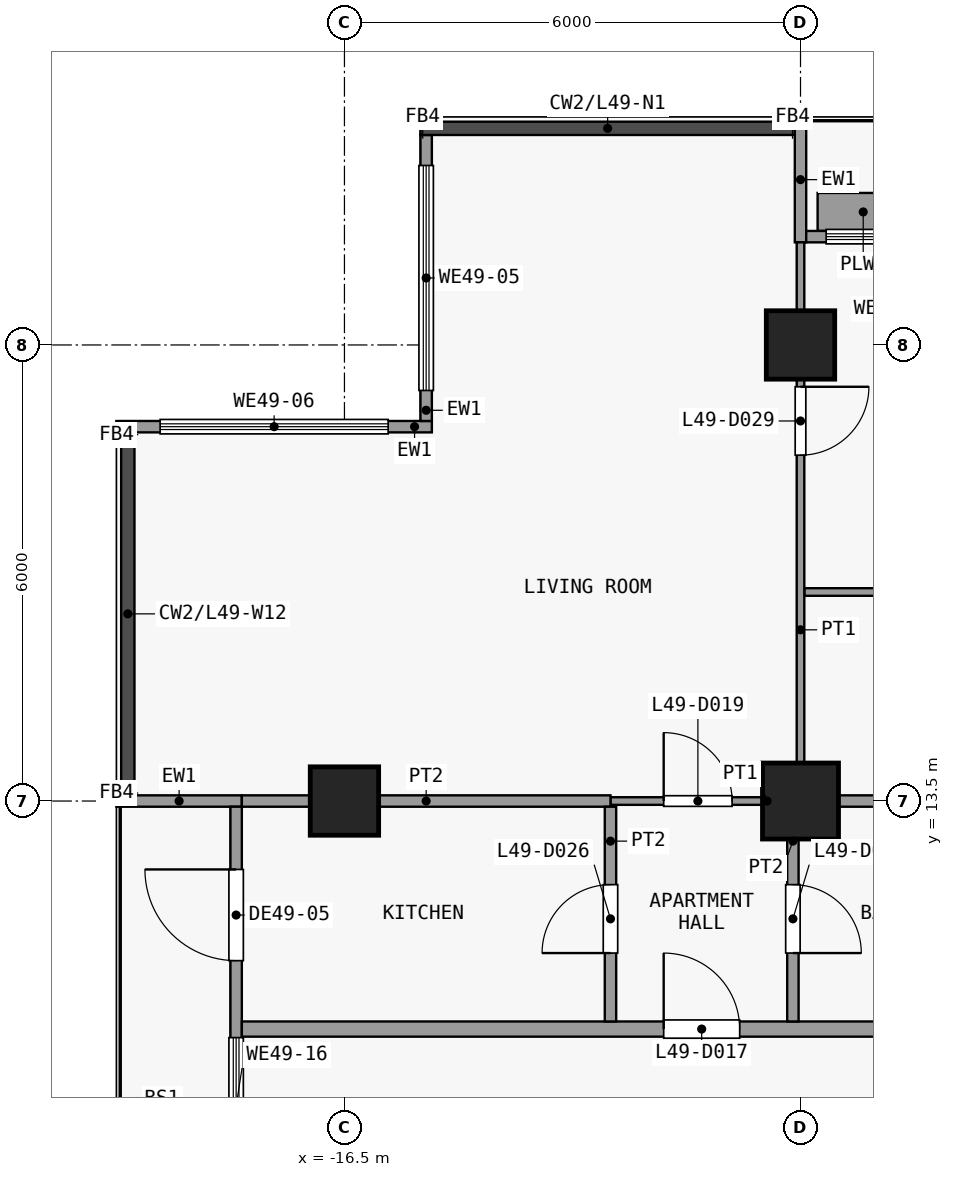
"""IFC4 building model, lengths in metres.
Left out: names, types, materials, properties, quantities, classifications, styles, units other than length and angle.
Written with IfcOpenShell. Run it as: python <this file> out.ifc"""

import sys

from ifc_helpers import new_model, si_unit, direction, frame, frame_2d, origin, origin_2d, place, context, subcontext, project, spatial, rectangle, extrude, element, fill, save


model = new_model("IFC4")
c1 = context("Model", 3, precision=1e-05, world=origin(), true_north=direction((0.0, 1.0)))
c2 = subcontext(c1, "Body", "Model", "MODEL_VIEW")
j1 = project(units=[si_unit("LENGTHUNIT", "METRE"), si_unit("PLANEANGLEUNIT", "RADIAN")], contexts=[c1])
p1 = place(None, origin())
s1 = spatial("IfcSite", under=j1, at=p1, CompositionType="ELEMENT")
p2 = place(p1, origin())
s2 = spatial("IfcBuilding", under=s1, at=p2, CompositionType="ELEMENT")
p3 = place(p2, frame((0.0, 0.0, 196.1)))
s3 = spatial("IfcBuildingStorey", under=s2, at=p3, CompositionType="ELEMENT", Elevation=196.1)
p4 = place(p3, frame((-16.5, 13.5, 0.0), z_axis=(0.0, 0.0, 1.0), x_axis=(1.0, 0.0, 0.0)))
e1 = element("IfcColumn", 1, at=p4, inside=s3, PredefinedType="COLUMN", context=c2, shape_type="SweptSolid", body=[
    extrude(rectangle(XDim=0.9, YDim=0.9, at=origin_2d()), origin(), (0.0, 0.0, 1.0), 3.6),
])
p5 = place(p3, frame((-10.5, 13.5, 0.0), z_axis=(0.0, 0.0, 1.0), x_axis=(1.0, 0.0, 0.0)))
e2 = element("IfcColumn", 2, at=p5, inside=s3, PredefinedType="COLUMN", context=c2, shape_type="SweptSolid", body=[
    extrude(rectangle(XDim=1.0, YDim=1.0, at=origin_2d()), origin(), (0.0, 0.0, 1.0), 3.6),
])
p6 = place(p3, frame((-10.5, 19.5, 0.0), z_axis=(0.0, 0.0, 1.0), x_axis=(1.0, 0.0, 0.0)))
e3 = element("IfcColumn", 3, at=p6, inside=s3, PredefinedType="COLUMN", context=c2, shape_type="SweptSolid", body=[
    extrude(rectangle(XDim=0.9, YDim=0.9, at=origin_2d()), origin(), (0.0, 0.0, 1.0), 3.6),
])
p7 = place(p3, frame((-15.425, 18.5, 0.0), z_axis=(0.0, 0.0, 1.0), x_axis=(0.0, 1.0, 0.0)))
e4 = element("IfcWall", 4, at=p7, inside=s3, PredefinedType="SOLIDWALL", context=c2, shape_type="SweptSolid", body=[
    extrude(rectangle(XDim=3.762, YDim=0.15, at=frame_2d((1.881, 0.0))), origin(), (0.0, 0.0, 1.0), 3.15),
])
p8 = place(p7, frame((0.401, 0.0, 0.9)))
e5 = element("IfcOpeningElement", 5, at=p8, cuts=e4, PredefinedType="OPENING", context=c2, shape_type="SweptSolid", body=[
    extrude(rectangle(XDim=2.96, YDim=2.4, at=frame_2d((1.48, 1.2))), frame((0.0, 0.085, 0.0), z_axis=(0.0, -1.0, 0.0), x_axis=(1.0, 0.0, 0.0)), (0.0, 0.0, 1.0), 0.17),
])
p9 = place(p3, frame((-19.5, 18.425, 0.0), z_axis=(0.0, 0.0, 1.0), x_axis=(1.0, 0.0, 0.0)))
e6 = element("IfcWall", 6, at=p9, inside=s3, PredefinedType="SOLIDWALL", context=c2, shape_type="SweptSolid", body=[
    extrude(rectangle(XDim=4.15, YDim=0.15, at=frame_2d((2.075, 0.0))), origin(), (0.0, 0.0, 1.0), 3.15),
])
p10 = place(p9, frame((0.575, 0.0, 0.9)))
e7 = element("IfcOpeningElement", 7, at=p10, cuts=e6, PredefinedType="OPENING", context=c2, shape_type="SweptSolid", body=[
    extrude(rectangle(XDim=3.0, YDim=2.4, at=frame_2d((1.5, 1.2))), frame((0.0, 0.085, 0.0), z_axis=(0.0, -1.0, 0.0), x_axis=(1.0, 0.0, 0.0)), (0.0, 0.0, 1.0), 0.17),
])
p11 = place(p3, frame((-10.5, 20.85, 0.0), z_axis=(0.0, 0.0, 1.0), x_axis=(0.0, 1.0, 0.0)))
e8 = element("IfcWall", 8, at=p11, inside=s3, PredefinedType="SOLIDWALL", context=c2, shape_type="SweptSolid", body=[
    extrude(rectangle(XDim=1.65, YDim=0.15, at=frame_2d((0.825, 0.0))), origin(), (0.0, 0.0, 1.0), 3.15),
])
p12 = place(p3, frame((-10.425, 20.925, 0.0), z_axis=(0.0, 0.0, 1.0), x_axis=(1.0, 0.0, 0.0)))
e9 = element("IfcWall", 9, at=p12, inside=s3, PredefinedType="SOLIDWALL", context=c2, shape_type="SweptSolid", body=[
    extrude(rectangle(XDim=5.85, YDim=0.15, at=frame_2d((2.925, 0.0))), origin(), (0.0, 0.0, 1.0), 3.15),
])
p13 = place(p12, frame((2.325, 0.0, 0.0)))
e10 = element("IfcOpeningElement", 10, at=p13, cuts=e9, PredefinedType="OPENING", context=c2, shape_type="SweptSolid", body=[
    extrude(rectangle(XDim=1.2, YDim=2.4, at=frame_2d((0.6, 1.2))), frame((0.0, 0.085, 0.0), z_axis=(0.0, -1.0, 0.0), x_axis=(1.0, 0.0, 0.0)), (0.0, 0.0, 1.0), 0.17),
])
p14 = place(p12, frame((0.262, 0.0, 0.9)))
e11 = element("IfcOpeningElement", 11, at=p14, cuts=e9, PredefinedType="OPENING", context=c2, shape_type="SweptSolid", body=[
    extrude(rectangle(XDim=1.8, YDim=2.1, at=frame_2d((0.9, 1.05))), frame((0.0, 0.085, 0.0), z_axis=(0.0, -1.0, 0.0), x_axis=(1.0, 0.0, 0.0)), (0.0, 0.0, 1.0), 0.17),
])
p15 = place(p12, frame((3.788, 0.0, 0.9)))
e12 = element("IfcOpeningElement", 12, at=p15, cuts=e9, PredefinedType="OPENING", context=c2, shape_type="SweptSolid", body=[
    extrude(rectangle(XDim=1.8, YDim=2.1, at=frame_2d((0.9, 1.05))), frame((0.0, 0.085, 0.0), z_axis=(0.0, -1.0, 0.0), x_axis=(1.0, 0.0, 0.0)), (0.0, 0.0, 1.0), 0.17),
])
p16 = place(p3, frame((-10.275, 21.25, 0.0), z_axis=(0.0, 0.0, 1.0), x_axis=(1.0, 0.0, 0.0)))
e13 = element("IfcWall", 13, at=p16, inside=s3, PredefinedType="USERDEFINED", context=c2, shape_type="SweptSolid", body=[
    extrude(rectangle(XDim=1.2, YDim=0.5, at=frame_2d((0.6, 0.0))), origin(), (0.0, 0.0, 1.0), 0.9),
])
p17 = place(p3, frame((-17.85, 13.5, 0.0), z_axis=(0.0, 0.0, 1.0), x_axis=(-1.0, 0.0, 0.0)))
e14 = element("IfcWall", 14, at=p17, inside=s3, PredefinedType="SOLIDWALL", context=c2, shape_type="SweptSolid", body=[
    extrude(rectangle(XDim=1.65, YDim=0.15, at=frame_2d((0.825, 0.0))), origin(), (0.0, 0.0, 1.0), 3.15),
])
p18 = place(p3, frame((-17.925, 7.575, 0.0), z_axis=(0.0, 0.0, 1.0), x_axis=(0.0, 1.0, 0.0)))
e15 = element("IfcWall", 15, at=p18, inside=s3, PredefinedType="SOLIDWALL", context=c2, shape_type="SweptSolid", body=[
    extrude(rectangle(XDim=5.85, YDim=0.15, at=frame_2d((2.925, 0.0))), origin(), (0.0, 0.0, 1.0), 3.15),
])
p19 = place(p18, frame((3.825, 0.0, 0.0)))
e16 = element("IfcOpeningElement", 16, at=p19, cuts=e15, PredefinedType="OPENING", context=c2, shape_type="SweptSolid", body=[
    extrude(rectangle(XDim=1.2, YDim=2.4, at=frame_2d((0.6, 1.2))), frame((0.0, 0.085, 0.0), z_axis=(0.0, -1.0, 0.0), x_axis=(1.0, 0.0, 0.0)), (0.0, 0.0, 1.0), 0.17),
])
p20 = place(p18, frame((1.012, 0.0, 0.9)))
e17 = element("IfcOpeningElement", 17, at=p20, cuts=e15, PredefinedType="OPENING", context=c2, shape_type="SweptSolid", body=[
    extrude(rectangle(XDim=1.8, YDim=2.1, at=frame_2d((0.9, 1.05))), frame((0.0, 0.085, 0.0), z_axis=(0.0, -1.0, 0.0), x_axis=(1.0, 0.0, 0.0)), (0.0, 0.0, 1.0), 0.17),
])
p21 = place(p3, frame((-17.85, 10.5, 0.0), z_axis=(0.0, 0.0, 1.0), x_axis=(1.0, 0.0, 0.0)))
e18 = element("IfcWall", 18, at=p21, inside=s3, PredefinedType="PARTITIONING", context=c2, shape_type="SweptSolid", body=[
    extrude(rectangle(XDim=35.7, YDim=0.2, at=frame_2d((17.85, 0.0))), origin(), (0.0, 0.0, 1.0), 3.15),
])
p22 = place(p21, frame((5.55, 0.0, 0.0)))
e19 = element("IfcOpeningElement", 19, at=p22, cuts=e18, PredefinedType="OPENING", context=c2, shape_type="SweptSolid", body=[
    extrude(rectangle(XDim=1.0, YDim=2.1, at=frame_2d((0.5, 1.05))), frame((0.0, 0.11, 0.0), z_axis=(0.0, -1.0, 0.0), x_axis=(1.0, 0.0, 0.0)), (0.0, 0.0, 1.0), 0.22),
])
p23 = place(p21, frame((16.55, 0.0, 0.0)))
e20 = element("IfcOpeningElement", 20, at=p23, cuts=e18, PredefinedType="OPENING", context=c2, shape_type="SweptSolid", body=[
    extrude(rectangle(XDim=1.0, YDim=2.1, at=frame_2d((0.5, 1.05))), frame((0.0, 0.11, 0.0), z_axis=(0.0, -1.0, 0.0), x_axis=(1.0, 0.0, 0.0)), (0.0, 0.0, 1.0), 0.22),
])
p24 = place(p3, frame((-13.0, 13.5, 0.0), z_axis=(0.0, 0.0, 1.0), x_axis=(1.0, 0.0, 0.0)))
e21 = element("IfcWall", 21, at=p24, inside=s3, PredefinedType="PARTITIONING", context=c2, shape_type="SweptSolid", body=[
    extrude(rectangle(XDim=2.4, YDim=0.1, at=frame_2d((1.2, 0.0))), origin(), (0.0, 0.0, 1.0), 3.15),
])
p25 = place(p24, frame((0.7, 0.0, 0.0)))
e22 = element("IfcOpeningElement", 22, at=p25, cuts=e21, PredefinedType="OPENING", context=c2, shape_type="SweptSolid", body=[
    extrude(rectangle(XDim=0.9, YDim=2.1, at=frame_2d((0.45, 1.05))), frame((0.0, 0.06, 0.0), z_axis=(0.0, -1.0, 0.0), x_axis=(1.0, 0.0, 0.0)), (0.0, 0.0, 1.0), 0.12),
])
p26 = place(p3, frame((-17.85, 13.5, 0.0), z_axis=(0.0, 0.0, 1.0), x_axis=(1.0, 0.0, 0.0)))
e23 = element("IfcWall", 23, at=p26, inside=s3, PredefinedType="PARTITIONING", context=c2, shape_type="SweptSolid", body=[
    extrude(rectangle(XDim=4.85, YDim=0.15, at=frame_2d((2.425, 0.0))), origin(), (0.0, 0.0, 1.0), 3.15),
])
p27 = place(p3, frame((-10.5, 13.5, 0.0), z_axis=(0.0, 0.0, 1.0), x_axis=(1.0, 0.0, 0.0)))
e24 = element("IfcWall", 24, at=p27, inside=s3, PredefinedType="PARTITIONING", context=c2, shape_type="SweptSolid", body=[
    extrude(rectangle(XDim=4.4, YDim=0.15, at=frame_2d((2.2, 0.0))), origin(), (0.0, 0.0, 1.0), 3.15),
])
p28 = place(p3, frame((-10.45, 16.25, 0.0), z_axis=(0.0, 0.0, 1.0), x_axis=(1.0, 0.0, 0.0)))
e25 = element("IfcWall", 25, at=p28, inside=s3, PredefinedType="PARTITIONING", context=c2, shape_type="SweptSolid", body=[
    extrude(rectangle(XDim=5.85, YDim=0.1, at=frame_2d((2.925, 0.0))), origin(), (0.0, 0.0, 1.0), 3.15),
])
p29 = place(p28, frame((2.5, 0.0, 0.0)))
e26 = element("IfcOpeningElement", 26, at=p29, cuts=e25, PredefinedType="OPENING", context=c2, shape_type="SweptSolid", body=[
    extrude(rectangle(XDim=0.9, YDim=2.1, at=frame_2d((0.45, 1.05))), frame((0.0, 0.06, 0.0), z_axis=(0.0, -1.0, 0.0), x_axis=(1.0, 0.0, 0.0)), (0.0, 0.0, 1.0), 0.12),
])
p30 = place(p3, frame((-13.0, 10.6, 0.0), z_axis=(0.0, 0.0, 1.0), x_axis=(0.0, 1.0, 0.0)))
e27 = element("IfcWall", 27, at=p30, inside=s3, PredefinedType="PARTITIONING", context=c2, shape_type="SweptSolid", body=[
    extrude(rectangle(XDim=2.825, YDim=0.15, at=frame_2d((1.413, 0.0))), origin(), (0.0, 0.0, 1.0), 3.15),
])
p31 = place(p30, frame((0.9, 0.0, 0.0)))
e28 = element("IfcOpeningElement", 28, at=p31, cuts=e27, PredefinedType="OPENING", context=c2, shape_type="SweptSolid", body=[
    extrude(rectangle(XDim=0.9, YDim=2.1, at=frame_2d((0.45, 1.05))), frame((0.0, 0.085, 0.0), z_axis=(0.0, -1.0, 0.0), x_axis=(1.0, 0.0, 0.0)), (0.0, 0.0, 1.0), 0.17),
])
p32 = place(p3, frame((-10.6, 10.6, 0.0), z_axis=(0.0, 0.0, 1.0), x_axis=(0.0, 1.0, 0.0)))
e29 = element("IfcWall", 29, at=p32, inside=s3, PredefinedType="PARTITIONING", context=c2, shape_type="SweptSolid", body=[
    extrude(rectangle(XDim=2.825, YDim=0.15, at=frame_2d((1.413, 0.0))), origin(), (0.0, 0.0, 1.0), 3.15),
])
p33 = place(p32, frame((0.9, 0.0, 0.0)))
e30 = element("IfcOpeningElement", 30, at=p33, cuts=e29, PredefinedType="OPENING", context=c2, shape_type="SweptSolid", body=[
    extrude(rectangle(XDim=0.9, YDim=2.1, at=frame_2d((0.45, 1.05))), frame((0.0, 0.085, 0.0), z_axis=(0.0, -1.0, 0.0), x_axis=(1.0, 0.0, 0.0)), (0.0, 0.0, 1.0), 0.17),
])
p34 = place(p3, frame((-10.5, 13.575, 0.0), z_axis=(0.0, 0.0, 1.0), x_axis=(0.0, 1.0, 0.0)))
e31 = element("IfcWall", 31, at=p34, inside=s3, PredefinedType="PARTITIONING", context=c2, shape_type="SweptSolid", body=[
    extrude(rectangle(XDim=7.275, YDim=0.1, at=frame_2d((3.638, 0.0))), origin(), (0.0, 0.0, 1.0), 3.15),
])
p35 = place(p34, frame((4.475, 0.0, 0.0)))
e32 = element("IfcOpeningElement", 32, at=p35, cuts=e31, PredefinedType="OPENING", context=c2, shape_type="SweptSolid", body=[
    extrude(rectangle(XDim=0.9, YDim=2.1, at=frame_2d((0.45, 1.05))), frame((0.0, 0.06, 0.0), z_axis=(0.0, -1.0, 0.0), x_axis=(1.0, 0.0, 0.0)), (0.0, 0.0, 1.0), 0.12),
])
p36 = place(p8, origin())
e33 = element("IfcWindow", 33, at=p36, inside=s3, PartitioningType="SINGLE_PANEL", PredefinedType="WINDOW", context=c2, shape_type="SweptSolid", body=[
    extrude(rectangle(XDim=2.96, YDim=2.4, at=frame_2d((1.48, 1.2))), frame((0.0, 0.03, 0.0), z_axis=(0.0, -1.0, 0.0), x_axis=(1.0, 0.0, 0.0)), (0.0, 0.0, 1.0), 0.06),
])
fill(e5, e33)
p37 = place(p10, origin())
e34 = element("IfcWindow", 34, at=p37, inside=s3, PartitioningType="SINGLE_PANEL", PredefinedType="WINDOW", context=c2, shape_type="SweptSolid", body=[
    extrude(rectangle(XDim=3.0, YDim=2.4, at=frame_2d((1.5, 1.2))), frame((0.0, 0.03, 0.0), z_axis=(0.0, -1.0, 0.0), x_axis=(1.0, 0.0, 0.0)), (0.0, 0.0, 1.0), 0.06),
])
fill(e7, e34)
p38 = place(p14, origin())
e35 = element("IfcWindow", 35, at=p38, inside=s3, PartitioningType="SINGLE_PANEL", PredefinedType="WINDOW", context=c2, shape_type="SweptSolid", body=[
    extrude(rectangle(XDim=1.8, YDim=2.1, at=frame_2d((0.9, 1.05))), frame((0.0, 0.03, 0.0), z_axis=(0.0, -1.0, 0.0), x_axis=(1.0, 0.0, 0.0)), (0.0, 0.0, 1.0), 0.06),
])
fill(e11, e35)
p39 = place(p19, origin())
e36 = element("IfcDoor", 36, at=p39, inside=s3, OperationType="SINGLE_SWING_RIGHT", PredefinedType="DOOR", context=c2, shape_type="SweptSolid", body=[
    extrude(rectangle(XDim=1.2, YDim=2.4, at=frame_2d((0.6, 1.2))), frame((0.0, 0.025, 0.0), z_axis=(0.0, -1.0, 0.0), x_axis=(1.0, 0.0, 0.0)), (0.0, 0.0, 1.0), 0.05),
])
fill(e16, e36)
p40 = place(p20, origin())
e37 = element("IfcWindow", 37, at=p40, inside=s3, PartitioningType="SINGLE_PANEL", PredefinedType="WINDOW", context=c2, shape_type="SweptSolid", body=[
    extrude(rectangle(XDim=1.8, YDim=2.1, at=frame_2d((0.9, 1.05))), frame((0.0, 0.03, 0.0), z_axis=(0.0, -1.0, 0.0), x_axis=(1.0, 0.0, 0.0)), (0.0, 0.0, 1.0), 0.06),
])
fill(e17, e37)
p41 = place(p22, origin())
e38 = element("IfcDoor", 38, at=p41, inside=s3, OperationType="SINGLE_SWING_RIGHT", PredefinedType="DOOR", context=c2, shape_type="SweptSolid", body=[
    extrude(rectangle(XDim=1.0, YDim=2.1, at=frame_2d((0.5, 1.05))), frame((0.0, 0.025, 0.0), z_axis=(0.0, -1.0, 0.0), x_axis=(1.0, 0.0, 0.0)), (0.0, 0.0, 1.0), 0.05),
])
fill(e19, e38)
p42 = place(p25, origin())
e39 = element("IfcDoor", 39, at=p42, inside=s3, OperationType="SINGLE_SWING_RIGHT", PredefinedType="DOOR", context=c2, shape_type="SweptSolid", body=[
    extrude(rectangle(XDim=0.9, YDim=2.1, at=frame_2d((0.45, 1.05))), frame((0.0, 0.025, 0.0), z_axis=(0.0, -1.0, 0.0), x_axis=(1.0, 0.0, 0.0)), (0.0, 0.0, 1.0), 0.05),
])
fill(e22, e39)
p43 = place(p31, origin())
e40 = element("IfcDoor", 40, at=p43, inside=s3, OperationType="SINGLE_SWING_RIGHT", PredefinedType="DOOR", context=c2, shape_type="SweptSolid", body=[
    extrude(rectangle(XDim=0.9, YDim=2.1, at=frame_2d((0.45, 1.05))), frame((0.0, 0.025, 0.0), z_axis=(0.0, -1.0, 0.0), x_axis=(1.0, 0.0, 0.0)), (0.0, 0.0, 1.0), 0.05),
])
fill(e28, e40)
p44 = place(p33, origin())
e41 = element("IfcDoor", 41, at=p44, inside=s3, OperationType="SINGLE_SWING_LEFT", PredefinedType="DOOR", context=c2, shape_type="SweptSolid", body=[
    extrude(rectangle(XDim=0.9, YDim=2.1, at=frame_2d((0.45, 1.05))), frame((0.0, 0.025, 0.0), z_axis=(0.0, -1.0, 0.0), x_axis=(1.0, 0.0, 0.0)), (0.0, 0.0, 1.0), 0.05),
])
fill(e30, e41)
p45 = place(p35, origin())
e42 = element("IfcDoor", 42, at=p45, inside=s3, OperationType="SINGLE_SWING_RIGHT", PredefinedType="DOOR", context=c2, shape_type="SweptSolid", body=[
    extrude(rectangle(XDim=0.9, YDim=2.1, at=frame_2d((0.45, 1.05))), frame((0.0, 0.025, 0.0), z_axis=(0.0, -1.0, 0.0), x_axis=(1.0, 0.0, 0.0)), (0.0, 0.0, 1.0), 0.05),
])
fill(e32, e42)
save(model, sys.argv[1])
